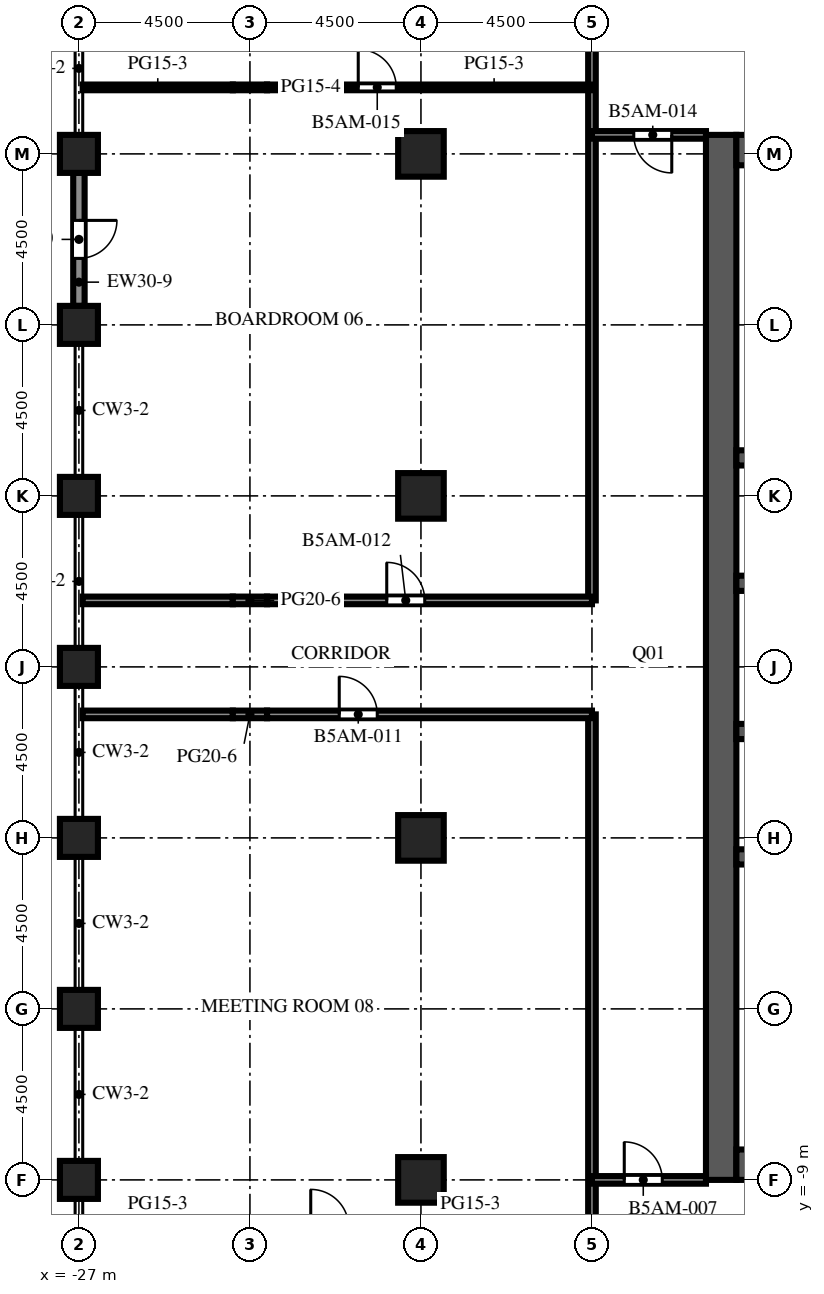
"""IFC4 building model, lengths in metres.
Left out: names, types, materials, properties, quantities, classifications, styles, units other than length and angle.
Written with IfcOpenShell. Run it as: python <this file> out.ifc"""

import sys

from ifc_helpers import new_model, si_unit, direction, frame, frame_2d, origin, origin_2d, place, context, subcontext, project, spatial, rectangle, extrude, element, fill, save


model = new_model("IFC4")
c1 = context("Model", 3, precision=1e-05, world=origin(), true_north=direction((0.0, 1.0)))
c2 = subcontext(c1, "Body", "Model", "MODEL_VIEW")
j1 = project(units=[si_unit("LENGTHUNIT", "METRE"), si_unit("PLANEANGLEUNIT", "RADIAN")], contexts=[c1])
p1 = place(None, origin())
s1 = spatial("IfcSite", under=j1, at=p1, CompositionType="ELEMENT")
p2 = place(p1, origin())
s2 = spatial("IfcBuilding", under=s1, at=p2, CompositionType="ELEMENT")
p3 = place(p2, frame((0.0, 0.0, 185.5)))
s3 = spatial("IfcBuildingStorey", under=s2, at=p3, CompositionType="ELEMENT", Elevation=185.5)
p4 = place(p3, frame((-27.0, -9.0, 0.0), z_axis=(0.0, 0.0, 1.0), x_axis=(1.0, 0.0, 0.0)))
e1 = element("IfcColumn", 1, at=p4, inside=s3, PredefinedType="COLUMN", context=c2, shape_type="SweptSolid", body=[
    extrude(rectangle(XDim=1.0, YDim=1.0, at=origin_2d()), origin(), (0.0, 0.0, 1.0), 3.75),
])
p5 = place(p3, frame((-27.0, -4.5, 0.0), z_axis=(0.0, 0.0, 1.0), x_axis=(1.0, 0.0, 0.0)))
e2 = element("IfcColumn", 2, at=p5, inside=s3, PredefinedType="COLUMN", context=c2, shape_type="SweptSolid", body=[
    extrude(rectangle(XDim=1.0, YDim=1.0, at=origin_2d()), origin(), (0.0, 0.0, 1.0), 6.0),
])
p6 = place(p3, frame((-27.0, 0.0, 0.0), z_axis=(0.0, 0.0, 1.0), x_axis=(1.0, 0.0, 0.0)))
e3 = element("IfcColumn", 3, at=p6, inside=s3, PredefinedType="COLUMN", context=c2, shape_type="SweptSolid", body=[
    extrude(rectangle(XDim=1.0, YDim=1.0, at=origin_2d()), origin(), (0.0, 0.0, 1.0), 3.75),
])
p7 = place(p3, frame((-27.0, 4.5, 0.0), z_axis=(0.0, 0.0, 1.0), x_axis=(1.0, 0.0, 0.0)))
e4 = element("IfcColumn", 4, at=p7, inside=s3, PredefinedType="COLUMN", context=c2, shape_type="SweptSolid", body=[
    extrude(rectangle(XDim=1.0, YDim=1.0, at=origin_2d()), origin(), (0.0, 0.0, 1.0), 6.0),
])
p8 = place(p3, frame((-27.0, 9.0, 0.0), z_axis=(0.0, 0.0, 1.0), x_axis=(1.0, 0.0, 0.0)))
e5 = element("IfcColumn", 5, at=p8, inside=s3, PredefinedType="COLUMN", context=c2, shape_type="SweptSolid", body=[
    extrude(rectangle(XDim=1.0, YDim=1.0, at=origin_2d()), origin(), (0.0, 0.0, 1.0), 3.75),
])
p9 = place(p3, frame((-27.0, 13.5, 0.0), z_axis=(0.0, 0.0, 1.0), x_axis=(1.0, 0.0, 0.0)))
e6 = element("IfcColumn", 6, at=p9, inside=s3, PredefinedType="COLUMN", context=c2, shape_type="SweptSolid", body=[
    extrude(rectangle(XDim=1.0, YDim=1.0, at=origin_2d()), origin(), (0.0, 0.0, 1.0), 6.0),
])
p10 = place(p3, frame((-27.0, 18.0, 0.0), z_axis=(0.0, 0.0, 1.0), x_axis=(1.0, 0.0, 0.0)))
e7 = element("IfcColumn", 7, at=p10, inside=s3, PredefinedType="COLUMN", context=c2, shape_type="SweptSolid", body=[
    extrude(rectangle(XDim=1.0, YDim=1.0, at=origin_2d()), origin(), (0.0, 0.0, 1.0), 3.75),
])
for number, where, z_axis, x_axis in (
    (8, (-18.0, -9.0, 0.0), (0.0, 0.0, 1.0), (1.0, 0.0, 0.0)),
    (9, (-18.0, 0.0, 0.0), (0.0, 0.0, 1.0), (1.0, 0.0, 0.0)),
    (10, (-18.0, 9.0, 0.0), (0.0, 0.0, 1.0), (1.0, 0.0, 0.0)),
    (11, (-18.0, 18.0, 0.0), (0.0, 0.0, 1.0), (1.0, 0.0, 0.0)),
):
    element("IfcColumn", number, at=place(p3, frame(where, z_axis=z_axis, x_axis=x_axis)), inside=s3, PredefinedType="COLUMN", context=c2, shape_type="SweptSolid", body=[
        extrude(rectangle(XDim=1.2, YDim=1.2, at=origin_2d()), origin(), (0.0, 0.0, 1.0), 5.55),
    ])
p11 = place(p3, frame((-10.1, -9.0, 0.0), z_axis=(0.0, 0.0, 1.0), x_axis=(0.0, 1.0, 0.0)))
e12 = element("IfcWall", 12, at=p11, inside=s3, PredefinedType="SHEAR", context=c2, shape_type="SweptSolid", body=[
    extrude(rectangle(XDim=27.5, YDim=0.8, at=frame_2d((13.75, 0.0))), origin(), (0.0, 0.0, 1.0), 6.0),
])
p12 = place(p11, frame((12.55, 0.0, 0.0)))
e13 = element("IfcOpeningElement", 13, at=p12, cuts=e12, PredefinedType="OPENING", context=c2, shape_type="SweptSolid", body=[
    extrude(rectangle(XDim=2.4, YDim=2.4, at=frame_2d((1.2, 1.2))), frame((0.0, 0.41, 0.0), z_axis=(0.0, -1.0, 0.0), x_axis=(1.0, 0.0, 0.0)), (0.0, 0.0, 1.0), 0.82),
])
p13 = place(p11, frame((6.825, 0.0, 0.0)))
e14 = element("IfcOpeningElement", 14, at=p13, cuts=e12, PredefinedType="OPENING", context=c2, shape_type="SweptSolid", body=[
    extrude(rectangle(XDim=1.2, YDim=2.1, at=frame_2d((0.6, 1.05))), frame((0.0, 0.41, 0.0), z_axis=(0.0, -1.0, 0.0), x_axis=(1.0, 0.0, 0.0)), (0.0, 0.0, 1.0), 0.82),
])
p14 = place(p11, frame((19.475, 0.0, 0.0)))
e15 = element("IfcOpeningElement", 15, at=p14, cuts=e12, PredefinedType="OPENING", context=c2, shape_type="SweptSolid", body=[
    extrude(rectangle(XDim=1.2, YDim=2.1, at=frame_2d((0.6, 1.05))), frame((0.0, 0.41, 0.0), z_axis=(0.0, -1.0, 0.0), x_axis=(1.0, 0.0, 0.0)), (0.0, 0.0, 1.0), 0.82),
])
for number, where, z_axis, x_axis in (
    (16, (-9.7, -8.6, 0.0), (0.0, 0.0, 1.0), (1.0, 0.0, 0.0)),
    (17, (-9.7, 18.1, 0.0), (0.0, 0.0, 1.0), (1.0, 0.0, 0.0)),
):
    element("IfcWall", number, at=place(p3, frame(where, z_axis=z_axis, x_axis=x_axis)), inside=s3, PredefinedType="SHEAR", context=c2, shape_type="SweptSolid", body=[
        extrude(rectangle(XDim=10.4, YDim=0.8, at=frame_2d((5.2, 0.0))), origin(), (0.0, 0.0, 1.0), 6.0),
    ])
p15 = place(p3, frame((-9.7, -0.5, 0.0), z_axis=(0.0, 0.0, 1.0), x_axis=(1.0, 0.0, 0.0)))
e18 = element("IfcWall", 18, at=p15, inside=s3, PredefinedType="SHEAR", context=c2, shape_type="SweptSolid", body=[
    extrude(rectangle(XDim=10.4, YDim=0.4, at=frame_2d((5.2, 0.0))), origin(), (0.0, 0.0, 1.0), 6.0),
])
p16 = place(p3, frame((-9.7, 2.8, 0.0), z_axis=(0.0, 0.0, 1.0), x_axis=(1.0, 0.0, 0.0)))
e19 = element("IfcWall", 19, at=p16, inside=s3, PredefinedType="SHEAR", context=c2, shape_type="SweptSolid", body=[
    extrude(rectangle(XDim=10.4, YDim=0.4, at=frame_2d((5.2, 0.0))), origin(), (0.0, 0.0, 1.0), 6.0),
])
p17 = place(p16, frame((0.738, 0.0, 0.0)))
e20 = element("IfcOpeningElement", 20, at=p17, cuts=e19, PredefinedType="OPENING", context=c2, shape_type="SweptSolid", body=[
    extrude(rectangle(XDim=1.1, YDim=2.1, at=frame_2d((0.55, 1.05))), frame((0.0, 0.21, 0.0), z_axis=(0.0, -1.0, 0.0), x_axis=(1.0, 0.0, 0.0)), (0.0, 0.0, 1.0), 0.42),
])
p18 = place(p16, frame((3.337, 0.0, 0.0)))
e21 = element("IfcOpeningElement", 21, at=p18, cuts=e19, PredefinedType="OPENING", context=c2, shape_type="SweptSolid", body=[
    extrude(rectangle(XDim=1.1, YDim=2.1, at=frame_2d((0.55, 1.05))), frame((0.0, 0.21, 0.0), z_axis=(0.0, -1.0, 0.0), x_axis=(1.0, 0.0, 0.0)), (0.0, 0.0, 1.0), 0.42),
])
p19 = place(p16, frame((6.012, 0.0, 0.0)))
e22 = element("IfcOpeningElement", 22, at=p19, cuts=e19, PredefinedType="OPENING", context=c2, shape_type="SweptSolid", body=[
    extrude(rectangle(XDim=1.0, YDim=2.1, at=frame_2d((0.5, 1.05))), frame((0.0, 0.21, 0.0), z_axis=(0.0, -1.0, 0.0), x_axis=(1.0, 0.0, 0.0)), (0.0, 0.0, 1.0), 0.42),
])
p20 = place(p16, frame((8.613, 0.0, 0.0)))
e23 = element("IfcOpeningElement", 23, at=p20, cuts=e19, PredefinedType="OPENING", context=c2, shape_type="SweptSolid", body=[
    extrude(rectangle(XDim=1.0, YDim=2.1, at=frame_2d((0.5, 1.05))), frame((0.0, 0.21, 0.0), z_axis=(0.0, -1.0, 0.0), x_axis=(1.0, 0.0, 0.0)), (0.0, 0.0, 1.0), 0.42),
])
p21 = place(p3, frame((-9.7, 6.7, 0.0), z_axis=(0.0, 0.0, 1.0), x_axis=(1.0, 0.0, 0.0)))
e24 = element("IfcWall", 24, at=p21, inside=s3, PredefinedType="SHEAR", context=c2, shape_type="SweptSolid", body=[
    extrude(rectangle(XDim=10.4, YDim=0.4, at=frame_2d((5.2, 0.0))), origin(), (0.0, 0.0, 1.0), 6.0),
])
p22 = place(p21, frame((3.337, 0.0, 0.0)))
e25 = element("IfcOpeningElement", 25, at=p22, cuts=e24, PredefinedType="OPENING", context=c2, shape_type="SweptSolid", body=[
    extrude(rectangle(XDim=1.1, YDim=2.1, at=frame_2d((0.55, 1.05))), frame((0.0, 0.21, 0.0), z_axis=(0.0, -1.0, 0.0), x_axis=(1.0, 0.0, 0.0)), (0.0, 0.0, 1.0), 0.42),
])
p23 = place(p21, frame((5.962, 0.0, 0.0)))
e26 = element("IfcOpeningElement", 26, at=p23, cuts=e24, PredefinedType="OPENING", context=c2, shape_type="SweptSolid", body=[
    extrude(rectangle(XDim=1.1, YDim=2.1, at=frame_2d((0.55, 1.05))), frame((0.0, 0.21, 0.0), z_axis=(0.0, -1.0, 0.0), x_axis=(1.0, 0.0, 0.0)), (0.0, 0.0, 1.0), 0.42),
])
p24 = place(p21, frame((8.663, 0.0, 0.0)))
e27 = element("IfcOpeningElement", 27, at=p24, cuts=e24, PredefinedType="OPENING", context=c2, shape_type="SweptSolid", body=[
    extrude(rectangle(XDim=1.1, YDim=2.1, at=frame_2d((0.55, 1.05))), frame((0.0, 0.21, 0.0), z_axis=(0.0, -1.0, 0.0), x_axis=(1.0, 0.0, 0.0)), (0.0, 0.0, 1.0), 0.42),
])
p25 = place(p21, frame((0.688, 0.0, 0.0)))
e28 = element("IfcOpeningElement", 28, at=p25, cuts=e24, PredefinedType="OPENING", context=c2, shape_type="SweptSolid", body=[
    extrude(rectangle(XDim=1.0, YDim=2.1, at=frame_2d((0.5, 1.05))), frame((0.0, 0.21, 0.0), z_axis=(0.0, -1.0, 0.0), x_axis=(1.0, 0.0, 0.0)), (0.0, 0.0, 1.0), 0.42),
])
p26 = place(p3, frame((-9.7, 10.0, 0.0), z_axis=(0.0, 0.0, 1.0), x_axis=(1.0, 0.0, 0.0)))
e29 = element("IfcWall", 29, at=p26, inside=s3, PredefinedType="SHEAR", context=c2, shape_type="SweptSolid", body=[
    extrude(rectangle(XDim=10.4, YDim=0.4, at=frame_2d((5.2, 0.0))), origin(), (0.0, 0.0, 1.0), 6.0),
])
p27 = place(p3, frame((-27.0, 14.0, 0.0), z_axis=(0.0, 0.0, 1.0), x_axis=(0.0, 1.0, 0.0)))
e30 = element("IfcWall", 30, at=p27, inside=s3, PredefinedType="SOLIDWALL", context=c2, shape_type="SweptSolid", body=[
    extrude(rectangle(XDim=3.5, YDim=0.3, at=frame_2d((1.75, 0.0))), origin(), (0.0, 0.0, 1.0), 4.75),
])
p28 = place(p27, frame((1.25, 0.0, 0.0)))
e31 = element("IfcOpeningElement", 31, at=p28, cuts=e30, PredefinedType="OPENING", context=c2, shape_type="SweptSolid", body=[
    extrude(rectangle(XDim=1.0, YDim=2.2, at=frame_2d((0.5, 1.1))), frame((0.0, 0.16, 0.0), z_axis=(0.0, -1.0, 0.0), x_axis=(1.0, 0.0, 0.0)), (0.0, 0.0, 1.0), 0.32),
])
p29 = place(p3, frame((-13.5, -26.5, 0.0), z_axis=(0.0, 0.0, 1.0), x_axis=(0.0, 1.0, 0.0)))
e32 = element("IfcWall", 32, at=p29, inside=s3, PredefinedType="PARTITIONING", context=c2, shape_type="SweptSolid", body=[
    extrude(rectangle(XDim=29.75, YDim=0.2, at=frame_2d((14.875, 0.0))), origin(), (0.0, 0.0, 1.0), 5.55),
])
p30 = place(p3, frame((-13.5, 6.25, 0.0), z_axis=(0.0, 0.0, 1.0), x_axis=(0.0, 1.0, 0.0)))
e33 = element("IfcWall", 33, at=p30, inside=s3, PredefinedType="PARTITIONING", context=c2, shape_type="SweptSolid", body=[
    extrude(rectangle(XDim=20.25, YDim=0.2, at=frame_2d((10.125, 0.0))), origin(), (0.0, 0.0, 1.0), 5.55),
])
p31 = place(p3, frame((-10.5, -9.0, 0.0), z_axis=(0.0, 0.0, 1.0), x_axis=(-1.0, 0.0, 0.0)))
e34 = element("IfcWall", 34, at=p31, inside=s3, PredefinedType="PARTITIONING", context=c2, shape_type="SweptSolid", body=[
    extrude(rectangle(XDim=3.0, YDim=0.2, at=frame_2d((1.5, 0.0))), origin(), (0.0, 0.0, 1.0), 5.55),
])
p32 = place(p31, frame((1.15, 0.0, 0.0)))
e35 = element("IfcOpeningElement", 35, at=p32, cuts=e34, PredefinedType="OPENING", context=c2, shape_type="SweptSolid", body=[
    extrude(rectangle(XDim=1.0, YDim=2.1, at=frame_2d((0.5, 1.05))), frame((0.0, 0.11, 0.0), z_axis=(0.0, -1.0, 0.0), x_axis=(1.0, 0.0, 0.0)), (0.0, 0.0, 1.0), 0.22),
])
p33 = place(p3, frame((-26.9, 3.25, 0.0), z_axis=(0.0, 0.0, 1.0), x_axis=(1.0, 0.0, 0.0)))
e36 = element("IfcWall", 36, at=p33, inside=s3, PredefinedType="PARTITIONING", context=c2, shape_type="SweptSolid", body=[
    extrude(rectangle(XDim=3.95, YDim=0.2, at=frame_2d((1.975, 0.0))), origin(), (0.0, 0.0, 1.0), 5.55),
])
p34 = place(p3, frame((-22.95, 3.25, 0.0), z_axis=(0.0, 0.0, 1.0), x_axis=(1.0, 0.0, 0.0)))
e37 = element("IfcWall", 37, at=p34, inside=s3, PredefinedType="PARTITIONING", context=c2, shape_type="SweptSolid", body=[
    extrude(rectangle(XDim=0.9, YDim=0.2, at=frame_2d((0.45, 0.0))), origin(), (0.0, 0.0, 1.0), 3.72),
])
p35 = place(p3, frame((-13.5, 3.25, 0.0), z_axis=(0.0, 0.0, 1.0), x_axis=(-1.0, 0.0, 0.0)))
e38 = element("IfcWall", 38, at=p35, inside=s3, PredefinedType="PARTITIONING", context=c2, shape_type="SweptSolid", body=[
    extrude(rectangle(XDim=8.55, YDim=0.2, at=frame_2d((4.275, 0.0))), origin(), (0.0, 0.0, 1.0), 5.55),
])
p36 = place(p35, frame((5.65, 0.0, 0.0)))
e39 = element("IfcOpeningElement", 39, at=p36, cuts=e38, PredefinedType="OPENING", context=c2, shape_type="SweptSolid", body=[
    extrude(rectangle(XDim=1.0, YDim=2.1, at=frame_2d((0.5, 1.05))), frame((0.0, 0.11, 0.0), z_axis=(0.0, -1.0, 0.0), x_axis=(1.0, 0.0, 0.0)), (0.0, 0.0, 1.0), 0.22),
])
p37 = place(p3, frame((-26.9, 6.25, 0.0), z_axis=(0.0, 0.0, 1.0), x_axis=(1.0, 0.0, 0.0)))
e40 = element("IfcWall", 40, at=p37, inside=s3, PredefinedType="PARTITIONING", context=c2, shape_type="SweptSolid", body=[
    extrude(rectangle(XDim=3.95, YDim=0.2, at=frame_2d((1.975, 0.0))), origin(), (0.0, 0.0, 1.0), 5.55),
])
p38 = place(p3, frame((-22.95, 6.25, 0.0), z_axis=(0.0, 0.0, 1.0), x_axis=(1.0, 0.0, 0.0)))
e41 = element("IfcWall", 41, at=p38, inside=s3, PredefinedType="PARTITIONING", context=c2, shape_type="SweptSolid", body=[
    extrude(rectangle(XDim=0.9, YDim=0.2, at=frame_2d((0.45, 0.0))), origin(), (0.0, 0.0, 1.0), 3.72),
])
p39 = place(p3, frame((-22.05, 6.25, 0.0), z_axis=(0.0, 0.0, 1.0), x_axis=(1.0, 0.0, 0.0)))
e42 = element("IfcWall", 42, at=p39, inside=s3, PredefinedType="PARTITIONING", context=c2, shape_type="SweptSolid", body=[
    extrude(rectangle(XDim=8.55, YDim=0.2, at=frame_2d((4.275, 0.0))), origin(), (0.0, 0.0, 1.0), 5.55),
])
p40 = place(p39, frame((3.15, 0.0, 0.0)))
e43 = element("IfcOpeningElement", 43, at=p40, cuts=e42, PredefinedType="OPENING", context=c2, shape_type="SweptSolid", body=[
    extrude(rectangle(XDim=1.0, YDim=2.1, at=frame_2d((0.5, 1.05))), frame((0.0, 0.11, 0.0), z_axis=(0.0, -1.0, 0.0), x_axis=(1.0, 0.0, 0.0)), (0.0, 0.0, 1.0), 0.22),
])
p41 = place(p3, frame((-13.5, 18.5, 0.0), z_axis=(0.0, 0.0, 1.0), x_axis=(1.0, 0.0, 0.0)))
e44 = element("IfcWall", 44, at=p41, inside=s3, PredefinedType="PARTITIONING", context=c2, shape_type="SweptSolid", body=[
    extrude(rectangle(XDim=3.0, YDim=0.2, at=frame_2d((1.5, 0.0))), origin(), (0.0, 0.0, 1.0), 5.55),
])
p42 = place(p41, frame((1.1, 0.0, 0.0)))
e45 = element("IfcOpeningElement", 45, at=p42, cuts=e44, PredefinedType="OPENING", context=c2, shape_type="SweptSolid", body=[
    extrude(rectangle(XDim=1.0, YDim=2.1, at=frame_2d((0.5, 1.05))), frame((0.0, 0.11, 0.0), z_axis=(0.0, -1.0, 0.0), x_axis=(1.0, 0.0, 0.0)), (0.0, 0.0, 1.0), 0.22),
])
p43 = place(p3, frame((-26.9, 19.75, 0.0), z_axis=(0.0, 0.0, 1.0), x_axis=(1.0, 0.0, 0.0)))
e46 = element("IfcWall", 46, at=p43, inside=s3, PredefinedType="PARTITIONING", context=c2, shape_type="SweptSolid", body=[
    extrude(rectangle(XDim=3.95, YDim=0.15, at=frame_2d((1.975, 0.0))), origin(), (0.0, 0.0, 1.0), 5.55),
])
p44 = place(p3, frame((-22.95, 19.75, 0.0), z_axis=(0.0, 0.0, 1.0), x_axis=(1.0, 0.0, 0.0)))
e47 = element("IfcWall", 47, at=p44, inside=s3, PredefinedType="PARTITIONING", context=c2, shape_type="SweptSolid", body=[
    extrude(rectangle(XDim=0.9, YDim=0.15, at=frame_2d((0.45, 0.0))), origin(), (0.0, 0.0, 1.0), 3.72),
])
p45 = place(p3, frame((-22.05, 19.75, 0.0), z_axis=(0.0, 0.0, 1.0), x_axis=(1.0, 0.0, 0.0)))
e48 = element("IfcWall", 48, at=p45, inside=s3, PredefinedType="PARTITIONING", context=c2, shape_type="SweptSolid", body=[
    extrude(rectangle(XDim=8.55, YDim=0.15, at=frame_2d((4.275, 0.0))), origin(), (0.0, 0.0, 1.0), 5.55),
])
p46 = place(p45, frame((2.4, 0.0, 0.0)))
e49 = element("IfcOpeningElement", 49, at=p46, cuts=e48, PredefinedType="OPENING", context=c2, shape_type="SweptSolid", body=[
    extrude(rectangle(XDim=1.0, YDim=2.1, at=frame_2d((0.5, 1.05))), frame((0.0, 0.085, 0.0), z_axis=(0.0, -1.0, 0.0), x_axis=(1.0, 0.0, 0.0)), (0.0, 0.0, 1.0), 0.17),
])
p47 = place(p28, origin())
e50 = element("IfcDoor", 50, at=p47, inside=s3, OperationType="SINGLE_SWING_RIGHT", PredefinedType="DOOR", context=c2, shape_type="SweptSolid", body=[
    extrude(rectangle(XDim=1.0, YDim=2.2, at=frame_2d((0.5, 1.1))), frame((0.0, 0.025, 0.0), z_axis=(0.0, -1.0, 0.0), x_axis=(1.0, 0.0, 0.0)), (0.0, 0.0, 1.0), 0.05),
])
fill(e31, e50)
p48 = place(p12, origin())
e51 = element("IfcDoor", 51, at=p48, inside=s3, OperationType="DOUBLE_DOOR_DOUBLE_SWING", PredefinedType="DOOR", context=c2, shape_type="SweptSolid", body=[
    extrude(rectangle(XDim=2.4, YDim=2.4, at=frame_2d((1.2, 1.2))), frame((0.0, 0.025, 0.0), z_axis=(0.0, -1.0, 0.0), x_axis=(1.0, 0.0, 0.0)), (0.0, 0.0, 1.0), 0.05),
])
fill(e13, e51)
p49 = place(p13, origin())
e52 = element("IfcDoor", 52, at=p49, inside=s3, OperationType="SINGLE_SWING_LEFT", PredefinedType="DOOR", context=c2, shape_type="SweptSolid", body=[
    extrude(rectangle(XDim=1.2, YDim=2.1, at=frame_2d((0.6, 1.05))), frame((0.0, 0.025, 0.0), z_axis=(0.0, -1.0, 0.0), x_axis=(1.0, 0.0, 0.0)), (0.0, 0.0, 1.0), 0.05),
])
fill(e14, e52)
p50 = place(p14, origin())
e53 = element("IfcDoor", 53, at=p50, inside=s3, OperationType="SINGLE_SWING_LEFT", PredefinedType="DOOR", context=c2, shape_type="SweptSolid", body=[
    extrude(rectangle(XDim=1.2, YDim=2.1, at=frame_2d((0.6, 1.05))), frame((0.0, 0.025, 0.0), z_axis=(0.0, -1.0, 0.0), x_axis=(1.0, 0.0, 0.0)), (0.0, 0.0, 1.0), 0.05),
])
fill(e15, e53)
p51 = place(p32, origin())
e54 = element("IfcDoor", 54, at=p51, inside=s3, OperationType="SINGLE_SWING_RIGHT", PredefinedType="DOOR", context=c2, shape_type="SweptSolid", body=[
    extrude(rectangle(XDim=1.0, YDim=2.1, at=frame_2d((0.5, 1.05))), frame((0.0, 0.025, 0.0), z_axis=(0.0, -1.0, 0.0), x_axis=(1.0, 0.0, 0.0)), (0.0, 0.0, 1.0), 0.05),
])
fill(e35, e54)
p52 = place(p36, origin())
e55 = element("IfcDoor", 55, at=p52, inside=s3, OperationType="SINGLE_SWING_RIGHT", PredefinedType="DOOR", context=c2, shape_type="SweptSolid", body=[
    extrude(rectangle(XDim=1.0, YDim=2.1, at=frame_2d((0.5, 1.05))), frame((0.0, 0.025, 0.0), z_axis=(0.0, -1.0, 0.0), x_axis=(1.0, 0.0, 0.0)), (0.0, 0.0, 1.0), 0.05),
])
fill(e39, e55)
p53 = place(p40, origin())
e56 = element("IfcDoor", 56, at=p53, inside=s3, OperationType="SINGLE_SWING_LEFT", PredefinedType="DOOR", context=c2, shape_type="SweptSolid", body=[
    extrude(rectangle(XDim=1.0, YDim=2.1, at=frame_2d((0.5, 1.05))), frame((0.0, 0.025, 0.0), z_axis=(0.0, -1.0, 0.0), x_axis=(1.0, 0.0, 0.0)), (0.0, 0.0, 1.0), 0.05),
])
fill(e43, e56)
p54 = place(p42, origin())
e57 = element("IfcDoor", 57, at=p54, inside=s3, OperationType="SINGLE_SWING_RIGHT", PredefinedType="DOOR", context=c2, shape_type="SweptSolid", body=[
    extrude(rectangle(XDim=1.0, YDim=2.1, at=frame_2d((0.5, 1.05))), frame((0.0, 0.025, 0.0), z_axis=(0.0, -1.0, 0.0), x_axis=(1.0, 0.0, 0.0)), (0.0, 0.0, 1.0), 0.05),
])
fill(e45, e57)
p55 = place(p46, origin())
e58 = element("IfcDoor", 58, at=p55, inside=s3, OperationType="SINGLE_SWING_LEFT", PredefinedType="DOOR", context=c2, shape_type="SweptSolid", body=[
    extrude(rectangle(XDim=1.0, YDim=2.1, at=frame_2d((0.5, 1.05))), frame((0.0, 0.025, 0.0), z_axis=(0.0, -1.0, 0.0), x_axis=(1.0, 0.0, 0.0)), (0.0, 0.0, 1.0), 0.05),
])
fill(e49, e58)
save(model, sys.argv[1])
